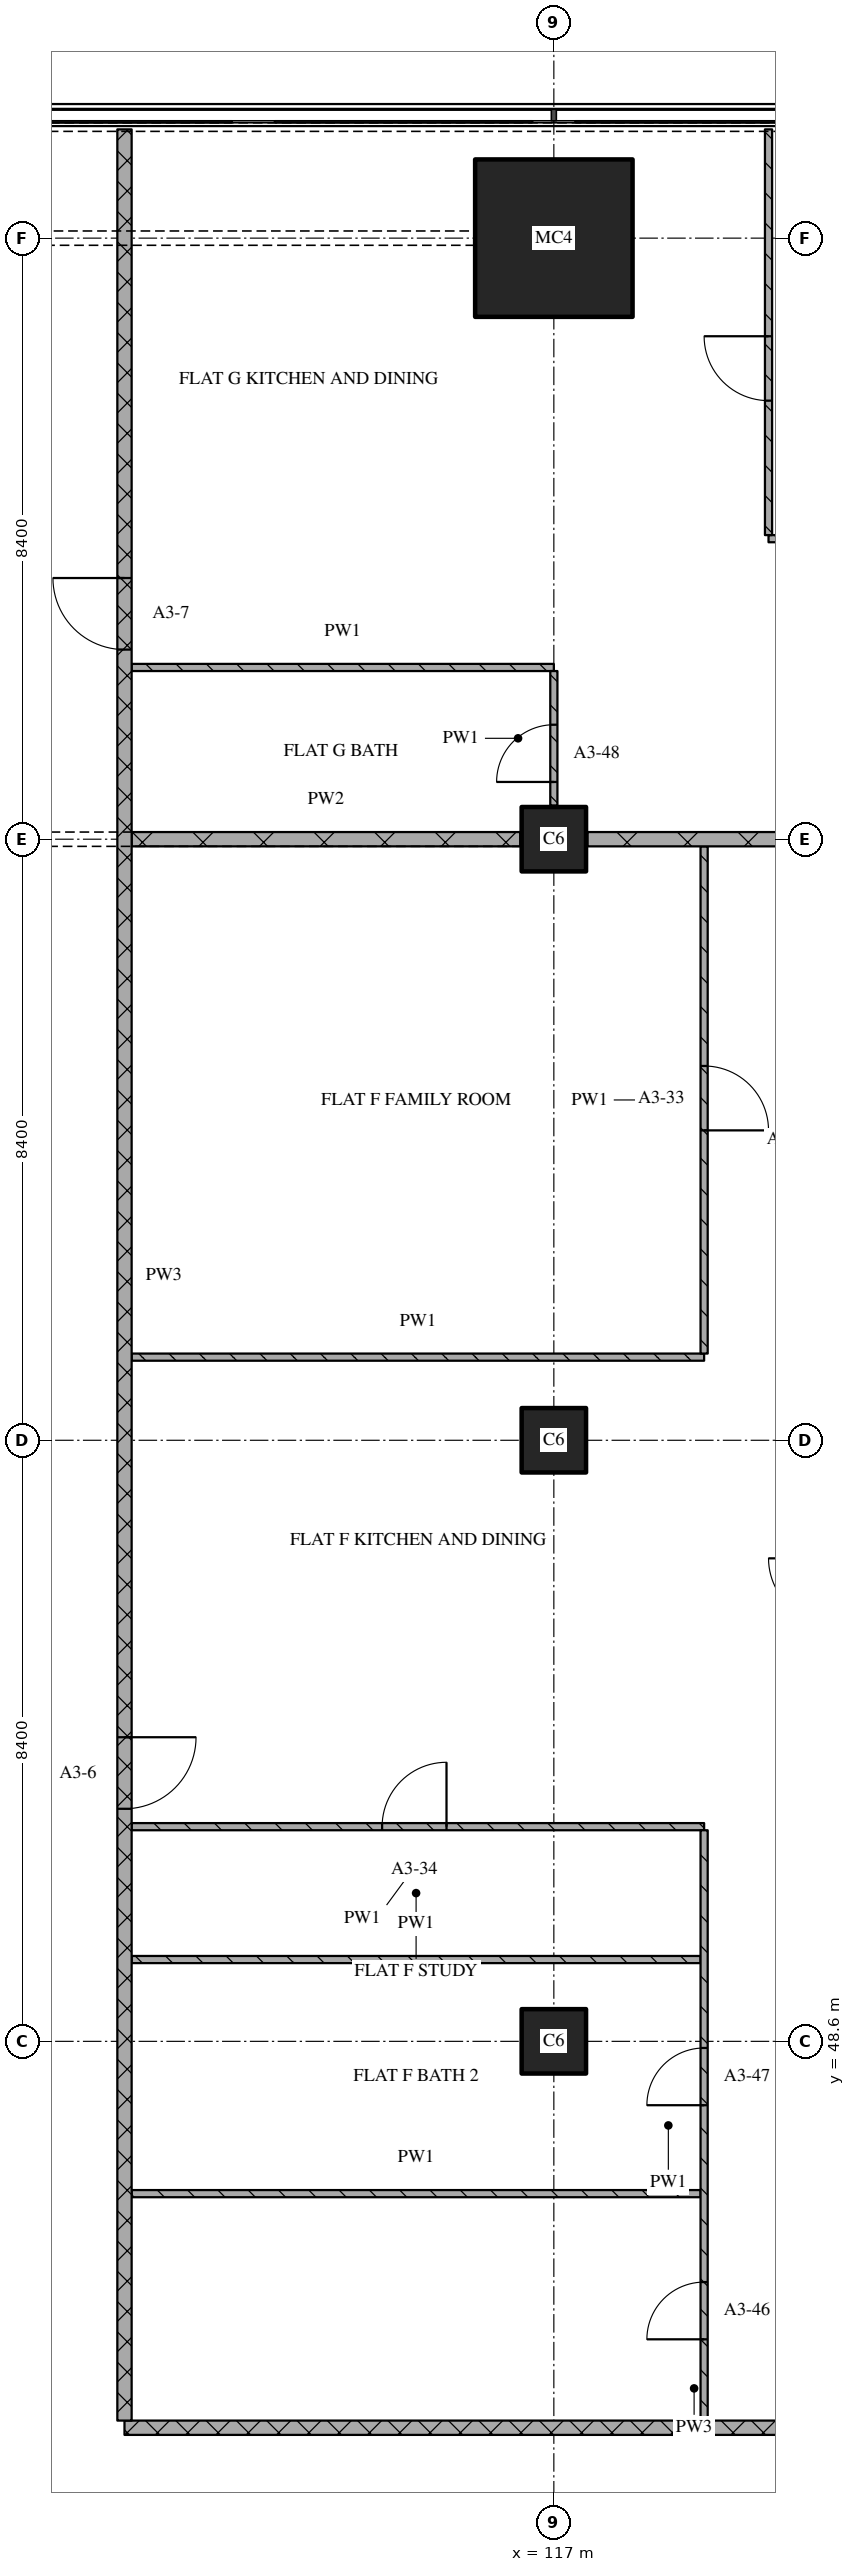
"""IFC4 building model, lengths in metres.
Left out: names, types, materials, properties, quantities, classifications, styles, units other than length and angle.
Written with IfcOpenShell. Run it as: python <this file> out.ifc"""

import sys

from ifc_helpers import new_model, si_unit, direction, frame, frame_2d, origin, origin_2d, place, context, subcontext, project, spatial, rectangle, extrude, element, fill, save


model = new_model("IFC4")
c1 = context("Model", 3, precision=1e-05, world=origin(), true_north=direction((0.0, 1.0)))
c2 = subcontext(c1, "Body", "Model", "MODEL_VIEW")
j1 = project(units=[si_unit("LENGTHUNIT", "METRE"), si_unit("PLANEANGLEUNIT", "RADIAN")], contexts=[c1])
p1 = place(None, origin())
s1 = spatial("IfcSite", under=j1, at=p1, CompositionType="ELEMENT")
p2 = place(p1, origin())
s2 = spatial("IfcBuilding", under=s1, at=p2, CompositionType="ELEMENT")
p3 = place(p2, frame((0.0, 0.0, 66.0)))
s3 = spatial("IfcBuildingStorey", under=s2, at=p3, CompositionType="ELEMENT", Elevation=66.0)
for number, where, z_axis, x_axis in (
    (1, (117.0, 48.6, 0.0), (0.0, 0.0, 1.0), (1.0, 0.0, 0.0)),
    (2, (117.0, 57.0, 0.0), (0.0, 0.0, 1.0), (1.0, 0.0, 0.0)),
    (3, (117.0, 65.4, 0.0), (0.0, 0.0, 1.0), (1.0, 0.0, 0.0)),
):
    element("IfcColumn", number, at=place(p3, frame(where, z_axis=z_axis, x_axis=x_axis)), inside=s3, PredefinedType="COLUMN", context=c2, shape_type="SweptSolid", body=[
        extrude(rectangle(XDim=0.9, YDim=0.9, at=origin_2d()), origin(), (0.0, 0.0, 1.0), 3.6),
    ])
p4 = place(p3, frame((117.0, 73.8, 0.0), z_axis=(0.0, 0.0, 1.0), x_axis=(1.0, 0.0, 0.0)))
e4 = element("IfcColumn", 4, at=p4, inside=s3, PredefinedType="COLUMN", context=c2, shape_type="SweptSolid", body=[
    extrude(rectangle(XDim=2.2, YDim=2.2, at=origin_2d()), origin(), (0.0, 0.0, 1.0), 3.6),
])
p5 = place(p3, frame((111.0, 43.2, 0.0), z_axis=(0.0, 0.0, 1.0), x_axis=(1.0, 0.0, 0.0)))
e5 = element("IfcWall", 5, at=p5, inside=s3, PredefinedType="PARTITIONING", context=c2, shape_type="SweptSolid", body=[
    extrude(rectangle(XDim=15.92, YDim=0.2, at=frame_2d((7.96, 0.0))), origin(), (0.0, 0.0, 1.0), 3.32),
])
for number, where, z_axis, x_axis in (
    (6, (111.1, 46.472, 0.0), (0.0, 0.0, 1.0), (1.0, 0.0, 0.0)),
    (7, (111.1, 49.743, 0.0), (0.0, 0.0, 1.0), (1.0, 0.0, 0.0)),
):
    element("IfcWall", number, at=place(p3, frame(where, z_axis=z_axis, x_axis=x_axis)), inside=s3, PredefinedType="PARTITIONING", context=c2, shape_type="SweptSolid", body=[
        extrude(rectangle(XDim=7.95, YDim=0.1, at=frame_2d((3.975, 0.0))), origin(), (0.0, 0.0, 1.0), 3.32),
    ])
p6 = place(p3, frame((119.1, 51.6, 0.0), z_axis=(0.0, 0.0, 1.0), x_axis=(-1.0, 0.0, 0.0)))
e8 = element("IfcWall", 8, at=p6, inside=s3, PredefinedType="PARTITIONING", context=c2, shape_type="SweptSolid", body=[
    extrude(rectangle(XDim=8.0, YDim=0.1, at=frame_2d((4.0, 0.0))), origin(), (0.0, 0.0, 1.0), 3.32),
])
p7 = place(p6, frame((3.6, 0.0, 0.0)))
e9 = element("IfcOpeningElement", 9, at=p7, cuts=e8, PredefinedType="OPENING", context=c2, shape_type="SweptSolid", body=[
    extrude(rectangle(XDim=0.9, YDim=2.1, at=frame_2d((0.45, 1.05))), frame((0.0, 0.06, 0.0), z_axis=(0.0, -1.0, 0.0), x_axis=(1.0, 0.0, 0.0)), (0.0, 0.0, 1.0), 0.12),
])
p8 = place(p3, frame((111.1, 58.162, 0.0), z_axis=(0.0, 0.0, 1.0), x_axis=(1.0, 0.0, 0.0)))
e10 = element("IfcWall", 10, at=p8, inside=s3, PredefinedType="PARTITIONING", context=c2, shape_type="SweptSolid", body=[
    extrude(rectangle(XDim=8.0, YDim=0.1, at=frame_2d((4.0, 0.0))), origin(), (0.0, 0.0, 1.0), 3.32),
])
p9 = place(p3, frame((111.1, 65.4, 0.0), z_axis=(0.0, 0.0, 1.0), x_axis=(1.0, 0.0, 0.0)))
e11 = element("IfcWall", 11, at=p9, inside=s3, PredefinedType="PARTITIONING", context=c2, shape_type="SweptSolid", body=[
    extrude(rectangle(XDim=5.43, YDim=0.2, at=frame_2d((2.715, 0.0))), origin(), (0.0, 0.0, 1.0), 2.82),
])
p10 = place(p3, frame((117.47, 65.4, 0.0), z_axis=(0.0, 0.0, 1.0), x_axis=(1.0, 0.0, 0.0)))
e12 = element("IfcWall", 12, at=p10, inside=s3, PredefinedType="PARTITIONING", context=c2, shape_type="SweptSolid", body=[
    extrude(rectangle(XDim=6.81, YDim=0.2, at=frame_2d((3.405, 0.0))), origin(), (0.0, 0.0, 1.0), 3.32),
])
p11 = place(p3, frame((111.1, 67.8, 0.0), z_axis=(0.0, 0.0, 1.0), x_axis=(1.0, 0.0, 0.0)))
e13 = element("IfcWall", 13, at=p11, inside=s3, PredefinedType="PARTITIONING", context=c2, shape_type="SweptSolid", body=[
    extrude(rectangle(XDim=5.9, YDim=0.1, at=frame_2d((2.95, 0.0))), origin(), (0.0, 0.0, 1.0), 3.32),
])
p12 = place(p3, frame((120.0, 69.6, 0.0), z_axis=(0.0, 0.0, 1.0), x_axis=(1.0, 0.0, 0.0)))
e14 = element("IfcWall", 14, at=p12, inside=s3, PredefinedType="PARTITIONING", context=c2, shape_type="SweptSolid", body=[
    extrude(rectangle(XDim=6.92, YDim=0.1, at=frame_2d((3.46, 0.0))), origin(), (0.0, 0.0, 1.0), 3.32),
])
p13 = place(p3, frame((111.0, 75.32, 0.0), z_axis=(0.0, 0.0, 1.0), x_axis=(0.0, -1.0, 0.0)))
e15 = element("IfcWall", 15, at=p13, inside=s3, PredefinedType="PARTITIONING", context=c2, shape_type="SweptSolid", body=[
    extrude(rectangle(XDim=32.02, YDim=0.2, at=frame_2d((16.01, 0.0))), origin(), (0.0, 0.0, 1.0), 3.32),
])
p14 = place(p13, frame((6.27, 0.0, 0.0)))
e16 = element("IfcOpeningElement", 16, at=p14, cuts=e15, PredefinedType="OPENING", context=c2, shape_type="SweptSolid", body=[
    extrude(rectangle(XDim=1.0, YDim=2.1, at=frame_2d((0.5, 1.05))), frame((0.0, 0.11, 0.0), z_axis=(0.0, -1.0, 0.0), x_axis=(1.0, 0.0, 0.0)), (0.0, 0.0, 1.0), 0.22),
])
p15 = place(p13, frame((22.47, 0.0, 0.0)))
e17 = element("IfcOpeningElement", 17, at=p15, cuts=e15, PredefinedType="OPENING", context=c2, shape_type="SweptSolid", body=[
    extrude(rectangle(XDim=1.0, YDim=2.1, at=frame_2d((0.5, 1.05))), frame((0.0, 0.11, 0.0), z_axis=(0.0, -1.0, 0.0), x_axis=(1.0, 0.0, 0.0)), (0.0, 0.0, 1.0), 0.22),
])
p16 = place(p3, frame((117.0, 65.87, 0.0), z_axis=(0.0, 0.0, 1.0), x_axis=(0.0, 1.0, 0.0)))
e18 = element("IfcWall", 18, at=p16, inside=s3, PredefinedType="PARTITIONING", context=c2, shape_type="SweptSolid", body=[
    extrude(rectangle(XDim=1.88, YDim=0.1, at=frame_2d((0.94, 0.0))), origin(), (0.0, 0.0, 1.0), 3.32),
])
p17 = place(p16, frame((0.33, 0.0, 0.0)))
e19 = element("IfcOpeningElement", 19, at=p17, cuts=e18, PredefinedType="OPENING", context=c2, shape_type="SweptSolid", body=[
    extrude(rectangle(XDim=0.8, YDim=2.1, at=frame_2d((0.4, 1.05))), frame((0.0, 0.06, 0.0), z_axis=(0.0, -1.0, 0.0), x_axis=(1.0, 0.0, 0.0)), (0.0, 0.0, 1.0), 0.12),
])
p18 = place(p3, frame((119.1, 43.3, 0.0), z_axis=(0.0, 0.0, 1.0), x_axis=(0.0, 1.0, 0.0)))
e20 = element("IfcWall", 20, at=p18, inside=s3, PredefinedType="PARTITIONING", context=c2, shape_type="SweptSolid", body=[
    extrude(rectangle(XDim=8.25, YDim=0.1, at=frame_2d((4.125, 0.0))), origin(), (0.0, 0.0, 1.0), 3.32),
])
p19 = place(p18, frame((1.136, 0.0, 0.0)))
e21 = element("IfcOpeningElement", 21, at=p19, cuts=e20, PredefinedType="OPENING", context=c2, shape_type="SweptSolid", body=[
    extrude(rectangle(XDim=0.8, YDim=2.1, at=frame_2d((0.4, 1.05))), frame((0.0, 0.06, 0.0), z_axis=(0.0, -1.0, 0.0), x_axis=(1.0, 0.0, 0.0)), (0.0, 0.0, 1.0), 0.12),
])
p20 = place(p18, frame((4.407, 0.0, 0.0)))
e22 = element("IfcOpeningElement", 22, at=p20, cuts=e20, PredefinedType="OPENING", context=c2, shape_type="SweptSolid", body=[
    extrude(rectangle(XDim=0.8, YDim=2.1, at=frame_2d((0.4, 1.05))), frame((0.0, 0.06, 0.0), z_axis=(0.0, -1.0, 0.0), x_axis=(1.0, 0.0, 0.0)), (0.0, 0.0, 1.0), 0.12),
])
p21 = place(p3, frame((119.1, 58.212, 0.0), z_axis=(0.0, 0.0, 1.0), x_axis=(0.0, 1.0, 0.0)))
e23 = element("IfcWall", 23, at=p21, inside=s3, PredefinedType="PARTITIONING", context=c2, shape_type="SweptSolid", body=[
    extrude(rectangle(XDim=7.088, YDim=0.1, at=frame_2d((3.544, 0.0))), origin(), (0.0, 0.0, 1.0), 3.32),
])
p22 = place(p21, frame((3.119, 0.0, 0.0)))
e24 = element("IfcOpeningElement", 24, at=p22, cuts=e23, PredefinedType="OPENING", context=c2, shape_type="SweptSolid", body=[
    extrude(rectangle(XDim=0.9, YDim=2.1, at=frame_2d((0.45, 1.05))), frame((0.0, 0.06, 0.0), z_axis=(0.0, -1.0, 0.0), x_axis=(1.0, 0.0, 0.0)), (0.0, 0.0, 1.0), 0.12),
])
p23 = place(p3, frame((120.0, 75.32, 0.0), z_axis=(0.0, 0.0, 1.0), x_axis=(0.0, -1.0, 0.0)))
e25 = element("IfcWall", 25, at=p23, inside=s3, PredefinedType="PARTITIONING", context=c2, shape_type="SweptSolid", body=[
    extrude(rectangle(XDim=5.67, YDim=0.1, at=frame_2d((2.835, 0.0))), origin(), (0.0, 0.0, 1.0), 3.32),
])
p24 = place(p23, frame((2.891, 0.0, 0.0)))
e26 = element("IfcOpeningElement", 26, at=p24, cuts=e25, PredefinedType="OPENING", context=c2, shape_type="SweptSolid", body=[
    extrude(rectangle(XDim=0.9, YDim=2.1, at=frame_2d((0.45, 1.05))), frame((0.0, 0.06, 0.0), z_axis=(0.0, -1.0, 0.0), x_axis=(1.0, 0.0, 0.0)), (0.0, 0.0, 1.0), 0.12),
])
p25 = place(p7, origin())
e27 = element("IfcDoor", 27, at=p25, inside=s3, OperationType="SINGLE_SWING_RIGHT", PredefinedType="DOOR", context=c2, shape_type="SweptSolid", body=[
    extrude(rectangle(XDim=0.9, YDim=2.1, at=frame_2d((0.45, 1.05))), frame((0.0, 0.025, 0.0), z_axis=(0.0, -1.0, 0.0), x_axis=(1.0, 0.0, 0.0)), (0.0, 0.0, 1.0), 0.05),
])
fill(e9, e27)
p26 = place(p14, origin())
e28 = element("IfcDoor", 28, at=p26, inside=s3, OperationType="SINGLE_SWING_RIGHT", PredefinedType="DOOR", context=c2, shape_type="SweptSolid", body=[
    extrude(rectangle(XDim=1.0, YDim=2.1, at=frame_2d((0.5, 1.05))), frame((0.0, 0.025, 0.0), z_axis=(0.0, -1.0, 0.0), x_axis=(1.0, 0.0, 0.0)), (0.0, 0.0, 1.0), 0.05),
])
fill(e16, e28)
p27 = place(p15, origin())
e29 = element("IfcDoor", 29, at=p27, inside=s3, OperationType="SINGLE_SWING_LEFT", PredefinedType="DOOR", context=c2, shape_type="SweptSolid", body=[
    extrude(rectangle(XDim=1.0, YDim=2.1, at=frame_2d((0.5, 1.05))), frame((0.0, 0.025, 0.0), z_axis=(0.0, -1.0, 0.0), x_axis=(1.0, 0.0, 0.0)), (0.0, 0.0, 1.0), 0.05),
])
fill(e17, e29)
p28 = place(p17, origin())
e30 = element("IfcDoor", 30, at=p28, inside=s3, OperationType="SINGLE_SWING_LEFT", PredefinedType="DOOR", context=c2, shape_type="SweptSolid", body=[
    extrude(rectangle(XDim=0.8, YDim=2.1, at=frame_2d((0.4, 1.05))), frame((0.0, 0.025, 0.0), z_axis=(0.0, -1.0, 0.0), x_axis=(1.0, 0.0, 0.0)), (0.0, 0.0, 1.0), 0.05),
])
fill(e19, e30)
p29 = place(p19, origin())
e31 = element("IfcDoor", 31, at=p29, inside=s3, OperationType="SINGLE_SWING_LEFT", PredefinedType="DOOR", context=c2, shape_type="SweptSolid", body=[
    extrude(rectangle(XDim=0.8, YDim=2.1, at=frame_2d((0.4, 1.05))), frame((0.0, 0.025, 0.0), z_axis=(0.0, -1.0, 0.0), x_axis=(1.0, 0.0, 0.0)), (0.0, 0.0, 1.0), 0.05),
])
fill(e21, e31)
p30 = place(p20, origin())
e32 = element("IfcDoor", 32, at=p30, inside=s3, OperationType="SINGLE_SWING_LEFT", PredefinedType="DOOR", context=c2, shape_type="SweptSolid", body=[
    extrude(rectangle(XDim=0.8, YDim=2.1, at=frame_2d((0.4, 1.05))), frame((0.0, 0.025, 0.0), z_axis=(0.0, -1.0, 0.0), x_axis=(1.0, 0.0, 0.0)), (0.0, 0.0, 1.0), 0.05),
])
fill(e22, e32)
p31 = place(p22, origin())
e33 = element("IfcDoor", 33, at=p31, inside=s3, OperationType="SINGLE_SWING_RIGHT", PredefinedType="DOOR", context=c2, shape_type="SweptSolid", body=[
    extrude(rectangle(XDim=0.9, YDim=2.1, at=frame_2d((0.45, 1.05))), frame((0.0, 0.025, 0.0), z_axis=(0.0, -1.0, 0.0), x_axis=(1.0, 0.0, 0.0)), (0.0, 0.0, 1.0), 0.05),
])
fill(e24, e33)
p32 = place(p24, origin())
e34 = element("IfcDoor", 34, at=p32, inside=s3, OperationType="SINGLE_SWING_RIGHT", PredefinedType="DOOR", context=c2, shape_type="SweptSolid", body=[
    extrude(rectangle(XDim=0.9, YDim=2.1, at=frame_2d((0.45, 1.05))), frame((0.0, 0.025, 0.0), z_axis=(0.0, -1.0, 0.0), x_axis=(1.0, 0.0, 0.0)), (0.0, 0.0, 1.0), 0.05),
])
fill(e26, e34)
save(model, sys.argv[1])
